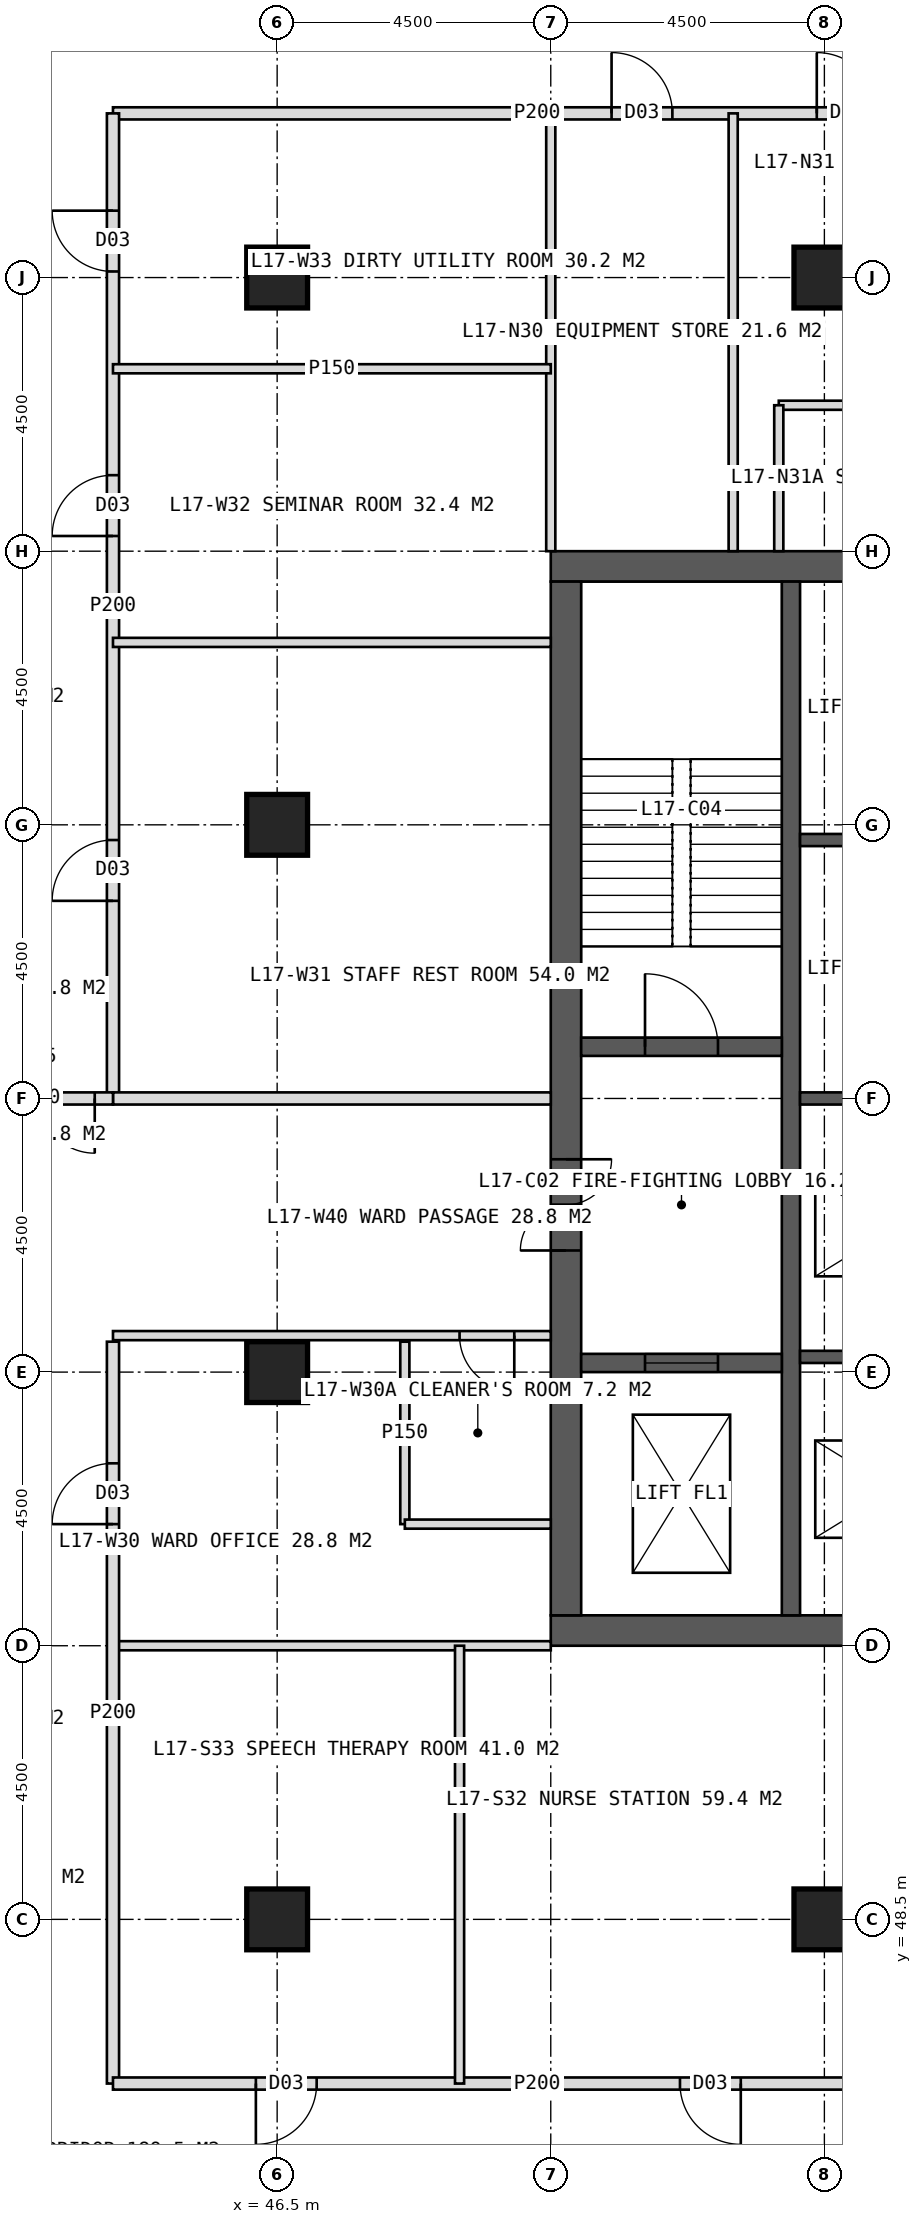
"""IFC4 building model, lengths in metres.
Left out: names, types, materials, properties, quantities, classifications, styles, units other than length and angle.
Written with IfcOpenShell. Run it as: python <this file> out.ifc"""

import sys

from ifc_helpers import new_model, si_unit, direction, frame, frame_2d, origin, origin_2d, place, context, subcontext, project, spatial, rectangle, hollow_rectangle, extrude, element, fill, save


model = new_model("IFC4")
c1 = context("Model", 3, precision=1e-05, world=origin(), true_north=direction((0.0, 1.0)))
c2 = subcontext(c1, "Body", "Model", "MODEL_VIEW")
j1 = project(units=[si_unit("LENGTHUNIT", "METRE"), si_unit("PLANEANGLEUNIT", "RADIAN")], contexts=[c1])
p1 = place(None, origin())
s1 = spatial("IfcSite", under=j1, at=p1, CompositionType="ELEMENT")
p2 = place(p1, origin())
s2 = spatial("IfcBuilding", under=s1, at=p2, CompositionType="ELEMENT")
p3 = place(p2, frame((0.0, 0.0, 75.0)))
s3 = spatial("IfcBuildingStorey", under=s2, at=p3, CompositionType="ELEMENT", Elevation=75.0)
p4 = place(p3, frame((51.0, 70.75, 0.0), z_axis=(0.0, 0.0, 1.0), x_axis=(1.0, 0.0, 0.0)))
e1 = element("IfcWall", 1, at=p4, inside=s3, PredefinedType="SHEAR", context=c2, shape_type="SweptSolid", body=[
    extrude(rectangle(XDim=18.0, YDim=0.5, at=frame_2d((9.0, 0.0))), origin(), (0.0, 0.0, 1.0), 4.0),
])
p5 = place(p4, frame((8.1, 0.0, 0.0)))
e2 = element("IfcOpeningElement", 2, at=p5, cuts=e1, PredefinedType="OPENING", context=c2, shape_type="SweptSolid", body=[
    extrude(rectangle(XDim=1.8, YDim=2.2, at=frame_2d((0.9, 1.1))), frame((0.0, 0.26, 0.0), z_axis=(0.0, -1.0, 0.0), x_axis=(1.0, 0.0, 0.0)), (0.0, 0.0, 1.0), 0.52),
])
p6 = place(p3, frame((51.0, 53.25, 0.0), z_axis=(0.0, 0.0, 1.0), x_axis=(1.0, 0.0, 0.0)))
e3 = element("IfcWall", 3, at=p6, inside=s3, PredefinedType="SHEAR", context=c2, shape_type="SweptSolid", body=[
    extrude(rectangle(XDim=18.0, YDim=0.5, at=frame_2d((9.0, 0.0))), origin(), (0.0, 0.0, 1.0), 4.0),
])
p7 = place(p6, frame((8.1, 0.0, 0.0)))
e4 = element("IfcOpeningElement", 4, at=p7, cuts=e3, PredefinedType="OPENING", context=c2, shape_type="SweptSolid", body=[
    extrude(rectangle(XDim=1.8, YDim=2.2, at=frame_2d((0.9, 1.1))), frame((0.0, 0.26, 0.0), z_axis=(0.0, -1.0, 0.0), x_axis=(1.0, 0.0, 0.0)), (0.0, 0.0, 1.0), 0.52),
])
p8 = place(p3, frame((51.25, 53.5, 0.0), z_axis=(0.0, 0.0, 1.0), x_axis=(0.0, 1.0, 0.0)))
e5 = element("IfcWall", 5, at=p8, inside=s3, PredefinedType="SHEAR", context=c2, shape_type="SweptSolid", body=[
    extrude(rectangle(XDim=17.0, YDim=0.5, at=frame_2d((8.5, 0.0))), origin(), (0.0, 0.0, 1.0), 4.0),
])
p9 = place(p8, frame((6.0, 0.0, 0.0)))
e6 = element("IfcOpeningElement", 6, at=p9, cuts=e5, PredefinedType="OPENING", context=c2, shape_type="SweptSolid", body=[
    extrude(rectangle(XDim=1.5, YDim=2.2, at=frame_2d((0.75, 1.1))), frame((0.0, 0.26, 0.0), z_axis=(0.0, -1.0, 0.0), x_axis=(1.0, 0.0, 0.0)), (0.0, 0.0, 1.0), 0.52),
])
p10 = place(p3, frame((54.95, 53.5, 0.0), z_axis=(0.0, 0.0, 1.0), x_axis=(0.0, 1.0, 0.0)))
e7 = element("IfcWall", 7, at=p10, inside=s3, PredefinedType="SHEAR", context=c2, shape_type="SweptSolid", body=[
    extrude(rectangle(XDim=17.0, YDim=0.3, at=frame_2d((8.5, 0.0))), origin(), (0.0, 0.0, 1.0), 4.0),
])
for number, where, z_axis, x_axis in (
    (8, (55.1, 57.75, 0.0), (0.0, 0.0, 1.0), (1.0, 0.0, 0.0)),
    (9, (55.1, 62.0, 0.0), (0.0, 0.0, 1.0), (1.0, 0.0, 0.0)),
    (10, (55.1, 66.25, 0.0), (0.0, 0.0, 1.0), (1.0, 0.0, 0.0)),
):
    element("IfcWall", number, at=place(p3, frame(where, z_axis=z_axis, x_axis=x_axis)), inside=s3, PredefinedType="SHEAR", context=c2, shape_type="SweptSolid", body=[
        extrude(rectangle(XDim=3.05, YDim=0.2, at=frame_2d((1.525, 0.0))), origin(), (0.0, 0.0, 1.0), 4.0),
    ])
p11 = place(p3, frame((51.5, 62.85, 0.0), z_axis=(0.0, 0.0, 1.0), x_axis=(1.0, 0.0, 0.0)))
e11 = element("IfcWall", 11, at=p11, inside=s3, PredefinedType="SHEAR", context=c2, shape_type="SweptSolid", body=[
    extrude(rectangle(XDim=3.3, YDim=0.3, at=frame_2d((1.65, 0.0))), origin(), (0.0, 0.0, 1.0), 4.0),
])
p12 = place(p11, frame((1.05, 0.0, 0.0)))
e12 = element("IfcOpeningElement", 12, at=p12, cuts=e11, PredefinedType="OPENING", context=c2, shape_type="SweptSolid", body=[
    extrude(rectangle(XDim=1.2, YDim=2.1, at=frame_2d((0.6, 1.05))), frame((0.0, 0.16, 0.0), z_axis=(0.0, -1.0, 0.0), x_axis=(1.0, 0.0, 0.0)), (0.0, 0.0, 1.0), 0.32),
])
p13 = place(p3, frame((51.5, 57.65, 0.0), z_axis=(0.0, 0.0, 1.0), x_axis=(1.0, 0.0, 0.0)))
e13 = element("IfcWall", 13, at=p13, inside=s3, PredefinedType="SHEAR", context=c2, shape_type="SweptSolid", body=[
    extrude(rectangle(XDim=3.3, YDim=0.3, at=frame_2d((1.65, 0.0))), origin(), (0.0, 0.0, 1.0), 4.0),
])
p14 = place(p13, frame((1.05, 0.0, 0.0)))
e14 = element("IfcOpeningElement", 14, at=p14, cuts=e13, PredefinedType="OPENING", context=c2, shape_type="SweptSolid", body=[
    extrude(rectangle(XDim=1.2, YDim=2.2, at=frame_2d((0.6, 1.1))), frame((0.0, 0.16, 0.0), z_axis=(0.0, -1.0, 0.0), x_axis=(1.0, 0.0, 0.0)), (0.0, 0.0, 1.0), 0.32),
])
for number, where, z_axis, x_axis in (
    (15, (46.5, 48.5, 0.0), (0.0, 0.0, 1.0), (1.0, 0.0, 0.0)),
    (16, (46.5, 75.5, 0.0), (0.0, 0.0, 1.0), (1.0, 0.0, 0.0)),
    (17, (55.5, 48.5, 0.0), (0.0, 0.0, 1.0), (1.0, 0.0, 0.0)),
    (18, (55.5, 75.5, 0.0), (0.0, 0.0, 1.0), (1.0, 0.0, 0.0)),
    (19, (46.5, 57.5, 0.0), (0.0, 0.0, 1.0), (1.0, 0.0, 0.0)),
    (20, (46.5, 66.5, 0.0), (0.0, 0.0, 1.0), (1.0, 0.0, 0.0)),
):
    element("IfcColumn", number, at=place(p3, frame(where, z_axis=z_axis, x_axis=x_axis)), inside=s3, PredefinedType="COLUMN", context=c2, shape_type="SweptSolid", body=[
        extrude(hollow_rectangle(XDim=1.0, YDim=1.0, WallThickness=0.1, at=origin_2d()), origin(), (0.0, 0.0, 1.0), 4.0),
    ])
p15 = place(p3, frame((51.0, 71.0, 0.0), z_axis=(0.0, 0.0, 1.0), x_axis=(0.0, 1.0, 0.0)))
e21 = element("IfcWall", 21, at=p15, inside=s3, PredefinedType="PARTITIONING", context=c2, shape_type="SweptSolid", body=[
    extrude(rectangle(XDim=7.2, YDim=0.15, at=frame_2d((3.6, 0.0))), origin(), (0.0, 0.0, 1.0), 3.75),
])
p16 = place(p3, frame((43.8, 78.2, 0.0), z_axis=(0.0, 0.0, 1.0), x_axis=(1.0, 0.0, 0.0)))
e22 = element("IfcWall", 22, at=p16, inside=s3, PredefinedType="PARTITIONING", context=c2, shape_type="SweptSolid", body=[
    extrude(rectangle(XDim=13.95, YDim=0.2, at=frame_2d((6.975, 0.0))), origin(), (0.0, 0.0, 1.0), 3.75),
])
p17 = place(p16, frame((8.2, 0.0, 0.0)))
e23 = element("IfcOpeningElement", 23, at=p17, cuts=e22, PredefinedType="OPENING", context=c2, shape_type="SweptSolid", body=[
    extrude(rectangle(XDim=1.0, YDim=2.1, at=frame_2d((0.5, 1.05))), frame((0.0, 0.11, 0.0), z_axis=(0.0, -1.0, 0.0), x_axis=(1.0, 0.0, 0.0)), (0.0, 0.0, 1.0), 0.22),
])
p18 = place(p16, frame((11.575, 0.0, 0.0)))
e24 = element("IfcOpeningElement", 24, at=p18, cuts=e22, PredefinedType="OPENING", context=c2, shape_type="SweptSolid", body=[
    extrude(rectangle(XDim=1.0, YDim=2.1, at=frame_2d((0.5, 1.05))), frame((0.0, 0.11, 0.0), z_axis=(0.0, -1.0, 0.0), x_axis=(1.0, 0.0, 0.0)), (0.0, 0.0, 1.0), 0.22),
])
p19 = place(p3, frame((54.0, 71.0, 0.0), z_axis=(0.0, 0.0, 1.0), x_axis=(0.0, 1.0, 0.0)))
e25 = element("IfcWall", 25, at=p19, inside=s3, PredefinedType="PARTITIONING", context=c2, shape_type="SweptSolid", body=[
    extrude(rectangle(XDim=7.2, YDim=0.15, at=frame_2d((3.6, 0.0))), origin(), (0.0, 0.0, 1.0), 3.75),
])
p20 = place(p3, frame((54.75, 73.4, 0.0), z_axis=(0.0, 0.0, 1.0), x_axis=(1.0, 0.0, 0.0)))
e26 = element("IfcWall", 26, at=p20, inside=s3, PredefinedType="PARTITIONING", context=c2, shape_type="SweptSolid", body=[
    extrude(rectangle(XDim=3.0, YDim=0.15, at=frame_2d((1.5, 0.0))), origin(), (0.0, 0.0, 1.0), 3.75),
])
p21 = place(p3, frame((54.75, 71.0, 0.0), z_axis=(0.0, 0.0, 1.0), x_axis=(0.0, 1.0, 0.0)))
e27 = element("IfcWall", 27, at=p21, inside=s3, PredefinedType="PARTITIONING", context=c2, shape_type="SweptSolid", body=[
    extrude(rectangle(XDim=2.4, YDim=0.15, at=frame_2d((1.2, 0.0))), origin(), (0.0, 0.0, 1.0), 3.75),
])
p22 = place(p3, frame((51.0, 53.0, 0.0), z_axis=(0.0, 0.0, 1.0), x_axis=(-1.0, 0.0, 0.0)))
e28 = element("IfcWall", 28, at=p22, inside=s3, PredefinedType="PARTITIONING", context=c2, shape_type="SweptSolid", body=[
    extrude(rectangle(XDim=7.2, YDim=0.15, at=frame_2d((3.6, 0.0))), origin(), (0.0, 0.0, 1.0), 3.75),
])
p23 = place(p3, frame((43.8, 45.8, 0.0), z_axis=(0.0, 0.0, 1.0), x_axis=(0.0, 1.0, 0.0)))
e29 = element("IfcWall", 29, at=p23, inside=s3, PredefinedType="PARTITIONING", context=c2, shape_type="SweptSolid", body=[
    extrude(rectangle(XDim=12.2, YDim=0.2, at=frame_2d((6.1, 0.0))), origin(), (0.0, 0.0, 1.0), 3.75),
])
p24 = place(p23, frame((9.2, 0.0, 0.0)))
e30 = element("IfcOpeningElement", 30, at=p24, cuts=e29, PredefinedType="OPENING", context=c2, shape_type="SweptSolid", body=[
    extrude(rectangle(XDim=1.0, YDim=2.1, at=frame_2d((0.5, 1.05))), frame((0.0, 0.11, 0.0), z_axis=(0.0, -1.0, 0.0), x_axis=(1.0, 0.0, 0.0)), (0.0, 0.0, 1.0), 0.22),
])
p25 = place(p3, frame((43.8, 62.0, 0.0), z_axis=(0.0, 0.0, 1.0), x_axis=(0.0, 1.0, 0.0)))
e31 = element("IfcWall", 31, at=p25, inside=s3, PredefinedType="PARTITIONING", context=c2, shape_type="SweptSolid", body=[
    extrude(rectangle(XDim=16.2, YDim=0.2, at=frame_2d((8.1, 0.0))), origin(), (0.0, 0.0, 1.0), 3.75),
])
p26 = place(p25, frame((3.25, 0.0, 0.0)))
e32 = element("IfcOpeningElement", 32, at=p26, cuts=e31, PredefinedType="OPENING", context=c2, shape_type="SweptSolid", body=[
    extrude(rectangle(XDim=1.0, YDim=2.1, at=frame_2d((0.5, 1.05))), frame((0.0, 0.11, 0.0), z_axis=(0.0, -1.0, 0.0), x_axis=(1.0, 0.0, 0.0)), (0.0, 0.0, 1.0), 0.22),
])
p27 = place(p25, frame((9.25, 0.0, 0.0)))
e33 = element("IfcOpeningElement", 33, at=p27, cuts=e31, PredefinedType="OPENING", context=c2, shape_type="SweptSolid", body=[
    extrude(rectangle(XDim=1.0, YDim=2.1, at=frame_2d((0.5, 1.05))), frame((0.0, 0.11, 0.0), z_axis=(0.0, -1.0, 0.0), x_axis=(1.0, 0.0, 0.0)), (0.0, 0.0, 1.0), 0.22),
])
p28 = place(p25, frame((13.6, 0.0, 0.0)))
e34 = element("IfcOpeningElement", 34, at=p28, cuts=e31, PredefinedType="OPENING", context=c2, shape_type="SweptSolid", body=[
    extrude(rectangle(XDim=1.0, YDim=2.1, at=frame_2d((0.5, 1.05))), frame((0.0, 0.11, 0.0), z_axis=(0.0, -1.0, 0.0), x_axis=(1.0, 0.0, 0.0)), (0.0, 0.0, 1.0), 0.22),
])
p29 = place(p3, frame((51.0, 58.1, 0.0), z_axis=(0.0, 0.0, 1.0), x_axis=(-1.0, 0.0, 0.0)))
e35 = element("IfcWall", 35, at=p29, inside=s3, PredefinedType="PARTITIONING", context=c2, shape_type="SweptSolid", body=[
    extrude(rectangle(XDim=7.2, YDim=0.15, at=frame_2d((3.6, 0.0))), origin(), (0.0, 0.0, 1.0), 3.75),
])
p30 = place(p29, frame((0.6, 0.0, 0.0)))
e36 = element("IfcOpeningElement", 36, at=p30, cuts=e35, PredefinedType="OPENING", context=c2, shape_type="SweptSolid", body=[
    extrude(rectangle(XDim=0.9, YDim=2.1, at=frame_2d((0.45, 1.05))), frame((0.0, 0.085, 0.0), z_axis=(0.0, -1.0, 0.0), x_axis=(1.0, 0.0, 0.0)), (0.0, 0.0, 1.0), 0.17),
])
p31 = place(p3, frame((51.0, 62.0, 0.0), z_axis=(0.0, 0.0, 1.0), x_axis=(-1.0, 0.0, 0.0)))
e37 = element("IfcWall", 37, at=p31, inside=s3, PredefinedType="SOLIDWALL", context=c2, shape_type="SweptSolid", body=[
    extrude(rectangle(XDim=7.2, YDim=0.2, at=frame_2d((3.6, 0.0))), origin(), (0.0, 0.0, 1.0), 2.75),
])
for number, where, z_axis, x_axis in (
    (38, (51.0, 69.5, 0.0), (0.0, 0.0, 1.0), (-1.0, 0.0, 0.0)),
    (39, (51.0, 74.0, 0.0), (0.0, 0.0, 1.0), (-1.0, 0.0, 0.0)),
):
    element("IfcWall", number, at=place(p3, frame(where, z_axis=z_axis, x_axis=x_axis)), inside=s3, PredefinedType="PARTITIONING", context=c2, shape_type="SweptSolid", body=[
        extrude(rectangle(XDim=7.2, YDim=0.15, at=frame_2d((3.6, 0.0))), origin(), (0.0, 0.0, 1.0), 3.75),
    ])
p32 = place(p3, frame((48.6, 55.0, 0.0), z_axis=(0.0, 0.0, 1.0), x_axis=(0.0, 1.0, 0.0)))
e40 = element("IfcWall", 40, at=p32, inside=s3, PredefinedType="PARTITIONING", context=c2, shape_type="SweptSolid", body=[
    extrude(rectangle(XDim=3.0, YDim=0.15, at=frame_2d((1.5, 0.0))), origin(), (0.0, 0.0, 1.0), 3.75),
])
p33 = place(p3, frame((51.0, 55.0, 0.0), z_axis=(0.0, 0.0, 1.0), x_axis=(-1.0, 0.0, 0.0)))
e41 = element("IfcWall", 41, at=p33, inside=s3, PredefinedType="PARTITIONING", context=c2, shape_type="SweptSolid", body=[
    extrude(rectangle(XDim=2.4, YDim=0.15, at=frame_2d((1.2, 0.0))), origin(), (0.0, 0.0, 1.0), 3.75),
])
p34 = place(p3, frame((57.75, 45.8, 0.0), z_axis=(0.0, 0.0, 1.0), x_axis=(-1.0, 0.0, 0.0)))
e42 = element("IfcWall", 42, at=p34, inside=s3, PredefinedType="PARTITIONING", context=c2, shape_type="SweptSolid", body=[
    extrude(rectangle(XDim=13.95, YDim=0.2, at=frame_2d((6.975, 0.0))), origin(), (0.0, 0.0, 1.0), 3.75),
])
p35 = place(p34, frame((3.625, 0.0, 0.0)))
e43 = element("IfcOpeningElement", 43, at=p35, cuts=e42, PredefinedType="OPENING", context=c2, shape_type="SweptSolid", body=[
    extrude(rectangle(XDim=1.0, YDim=2.1, at=frame_2d((0.5, 1.05))), frame((0.0, 0.11, 0.0), z_axis=(0.0, -1.0, 0.0), x_axis=(1.0, 0.0, 0.0)), (0.0, 0.0, 1.0), 0.22),
])
p36 = place(p34, frame((10.6, 0.0, 0.0)))
e44 = element("IfcOpeningElement", 44, at=p36, cuts=e42, PredefinedType="OPENING", context=c2, shape_type="SweptSolid", body=[
    extrude(rectangle(XDim=1.0, YDim=2.1, at=frame_2d((0.5, 1.05))), frame((0.0, 0.11, 0.0), z_axis=(0.0, -1.0, 0.0), x_axis=(1.0, 0.0, 0.0)), (0.0, 0.0, 1.0), 0.22),
])
p37 = place(p3, frame((49.5, 53.0, 0.0), z_axis=(0.0, 0.0, 1.0), x_axis=(0.0, -1.0, 0.0)))
e45 = element("IfcWall", 45, at=p37, inside=s3, PredefinedType="PARTITIONING", context=c2, shape_type="SweptSolid", body=[
    extrude(rectangle(XDim=7.2, YDim=0.15, at=frame_2d((3.6, 0.0))), origin(), (0.0, 0.0, 1.0), 3.75),
])
p38 = place(p3, frame((43.8, 62.0, 0.0), z_axis=(0.0, 0.0, 1.0), x_axis=(-1.0, 0.0, 0.0)))
e46 = element("IfcWall", 46, at=p38, inside=s3, PredefinedType="SOLIDWALL", context=c2, shape_type="SweptSolid", body=[
    extrude(rectangle(XDim=2.7, YDim=0.2, at=frame_2d((1.35, 0.0))), origin(), (0.0, 0.0, 1.0), 2.75),
])
p39 = place(p38, frame((0.3, 0.0, 0.0)))
e47 = element("IfcOpeningElement", 47, at=p39, cuts=e46, PredefinedType="OPENING", context=c2, shape_type="SweptSolid", body=[
    extrude(rectangle(XDim=1.8, YDim=2.2, at=frame_2d((0.9, 1.1))), frame((0.0, 0.11, 0.0), z_axis=(0.0, -1.0, 0.0), x_axis=(1.0, 0.0, 0.0)), (0.0, 0.0, 1.0), 0.22),
])
p40 = place(p17, origin())
e48 = element("IfcDoor", 48, at=p40, inside=s3, OperationType="SINGLE_SWING_LEFT", PredefinedType="DOOR", context=c2, shape_type="SweptSolid", body=[
    extrude(rectangle(XDim=1.0, YDim=2.1, at=frame_2d((0.5, 1.05))), frame((0.0, 0.025, 0.0), z_axis=(0.0, -1.0, 0.0), x_axis=(1.0, 0.0, 0.0)), (0.0, 0.0, 1.0), 0.05),
])
fill(e23, e48)
p41 = place(p18, origin())
e49 = element("IfcDoor", 49, at=p41, inside=s3, OperationType="SINGLE_SWING_LEFT", PredefinedType="DOOR", context=c2, shape_type="SweptSolid", body=[
    extrude(rectangle(XDim=1.0, YDim=2.1, at=frame_2d((0.5, 1.05))), frame((0.0, 0.025, 0.0), z_axis=(0.0, -1.0, 0.0), x_axis=(1.0, 0.0, 0.0)), (0.0, 0.0, 1.0), 0.05),
])
fill(e24, e49)
p42 = place(p30, origin())
e50 = element("IfcDoor", 50, at=p42, inside=s3, OperationType="SINGLE_SWING_LEFT", PredefinedType="DOOR", context=c2, shape_type="SweptSolid", body=[
    extrude(rectangle(XDim=0.9, YDim=2.1, at=frame_2d((0.45, 1.05))), frame((0.0, 0.025, 0.0), z_axis=(0.0, -1.0, 0.0), x_axis=(1.0, 0.0, 0.0)), (0.0, 0.0, 1.0), 0.05),
])
fill(e36, e50)
p43 = place(p24, origin())
e51 = element("IfcDoor", 51, at=p43, inside=s3, OperationType="SINGLE_SWING_LEFT", PredefinedType="DOOR", context=c2, shape_type="SweptSolid", body=[
    extrude(rectangle(XDim=1.0, YDim=2.1, at=frame_2d((0.5, 1.05))), frame((0.0, 0.025, 0.0), z_axis=(0.0, -1.0, 0.0), x_axis=(1.0, 0.0, 0.0)), (0.0, 0.0, 1.0), 0.05),
])
fill(e30, e51)
p44 = place(p26, origin())
e52 = element("IfcDoor", 52, at=p44, inside=s3, OperationType="SINGLE_SWING_LEFT", PredefinedType="DOOR", context=c2, shape_type="SweptSolid", body=[
    extrude(rectangle(XDim=1.0, YDim=2.1, at=frame_2d((0.5, 1.05))), frame((0.0, 0.025, 0.0), z_axis=(0.0, -1.0, 0.0), x_axis=(1.0, 0.0, 0.0)), (0.0, 0.0, 1.0), 0.05),
])
fill(e32, e52)
p45 = place(p27, origin())
e53 = element("IfcDoor", 53, at=p45, inside=s3, OperationType="SINGLE_SWING_LEFT", PredefinedType="DOOR", context=c2, shape_type="SweptSolid", body=[
    extrude(rectangle(XDim=1.0, YDim=2.1, at=frame_2d((0.5, 1.05))), frame((0.0, 0.025, 0.0), z_axis=(0.0, -1.0, 0.0), x_axis=(1.0, 0.0, 0.0)), (0.0, 0.0, 1.0), 0.05),
])
fill(e33, e53)
p46 = place(p28, origin())
e54 = element("IfcDoor", 54, at=p46, inside=s3, OperationType="SINGLE_SWING_RIGHT", PredefinedType="DOOR", context=c2, shape_type="SweptSolid", body=[
    extrude(rectangle(XDim=1.0, YDim=2.1, at=frame_2d((0.5, 1.05))), frame((0.0, 0.025, 0.0), z_axis=(0.0, -1.0, 0.0), x_axis=(1.0, 0.0, 0.0)), (0.0, 0.0, 1.0), 0.05),
])
fill(e34, e54)
p47 = place(p35, origin())
e55 = element("IfcDoor", 55, at=p47, inside=s3, OperationType="SINGLE_SWING_LEFT", PredefinedType="DOOR", context=c2, shape_type="SweptSolid", body=[
    extrude(rectangle(XDim=1.0, YDim=2.1, at=frame_2d((0.5, 1.05))), frame((0.0, 0.025, 0.0), z_axis=(0.0, -1.0, 0.0), x_axis=(1.0, 0.0, 0.0)), (0.0, 0.0, 1.0), 0.05),
])
fill(e43, e55)
p48 = place(p36, origin())
e56 = element("IfcDoor", 56, at=p48, inside=s3, OperationType="SINGLE_SWING_RIGHT", PredefinedType="DOOR", context=c2, shape_type="SweptSolid", body=[
    extrude(rectangle(XDim=1.0, YDim=2.1, at=frame_2d((0.5, 1.05))), frame((0.0, 0.025, 0.0), z_axis=(0.0, -1.0, 0.0), x_axis=(1.0, 0.0, 0.0)), (0.0, 0.0, 1.0), 0.05),
])
fill(e44, e56)
p49 = place(p39, origin())
e57 = element("IfcDoor", 57, at=p49, inside=s3, OperationType="DOUBLE_DOOR_DOUBLE_SWING", PredefinedType="DOOR", context=c2, shape_type="SweptSolid", body=[
    extrude(rectangle(XDim=1.8, YDim=2.2, at=frame_2d((0.9, 1.1))), frame((0.0, 0.025, 0.0), z_axis=(0.0, -1.0, 0.0), x_axis=(1.0, 0.0, 0.0)), (0.0, 0.0, 1.0), 0.05),
])
fill(e47, e57)
p50 = place(p9, origin())
e58 = element("IfcDoor", 58, at=p50, inside=s3, OperationType="DOUBLE_DOOR_SINGLE_SWING", PredefinedType="DOOR", context=c2, shape_type="SweptSolid", body=[
    extrude(rectangle(XDim=1.5, YDim=2.2, at=frame_2d((0.75, 1.1))), frame((0.0, 0.025, 0.0), z_axis=(0.0, -1.0, 0.0), x_axis=(1.0, 0.0, 0.0)), (0.0, 0.0, 1.0), 0.05),
])
fill(e6, e58)
p51 = place(p12, origin())
e59 = element("IfcDoor", 59, at=p51, inside=s3, OperationType="SINGLE_SWING_LEFT", PredefinedType="DOOR", context=c2, shape_type="SweptSolid", body=[
    extrude(rectangle(XDim=1.2, YDim=2.1, at=frame_2d((0.6, 1.05))), frame((0.0, 0.025, 0.0), z_axis=(0.0, -1.0, 0.0), x_axis=(1.0, 0.0, 0.0)), (0.0, 0.0, 1.0), 0.05),
])
fill(e12, e59)
p52 = place(p14, origin())
e60 = element("IfcDoor", 60, at=p52, inside=s3, OperationType="SLIDING_TO_LEFT", PredefinedType="DOOR", context=c2, shape_type="SweptSolid", body=[
    extrude(rectangle(XDim=1.2, YDim=2.2, at=frame_2d((0.6, 1.1))), frame((0.0, 0.025, 0.0), z_axis=(0.0, -1.0, 0.0), x_axis=(1.0, 0.0, 0.0)), (0.0, 0.0, 1.0), 0.05),
])
fill(e14, e60)
save(model, sys.argv[1])
